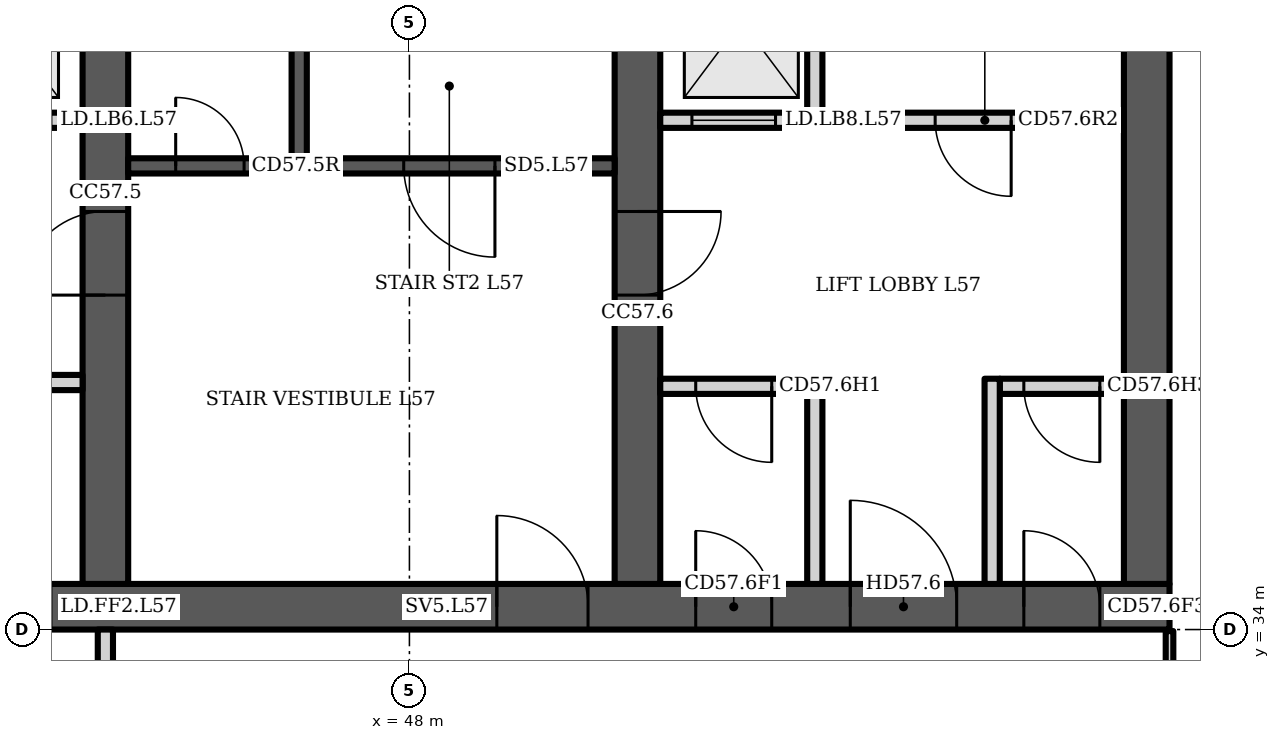
"""IFC4 building model, lengths in metres.
Left out: names, types, materials, properties, quantities, classifications, styles, units other than length and angle.
Written with IfcOpenShell. Run it as: python <this file> out.ifc"""

import sys

from ifc_helpers import new_model, si_unit, direction, frame, frame_2d, origin, place, context, subcontext, project, spatial, polyline, rectangle, outline, extrude, element, fill, save


model = new_model("IFC4")
c1 = context("Model", 3, precision=1e-05, world=origin(), true_north=direction((0.0, 1.0)))
c2 = subcontext(c1, "Body", "Model", "MODEL_VIEW")
j1 = project(units=[si_unit("LENGTHUNIT", "METRE"), si_unit("PLANEANGLEUNIT", "RADIAN")], contexts=[c1])
p1 = place(None, origin())
s1 = spatial("IfcSite", under=j1, at=p1, CompositionType="ELEMENT")
p2 = place(p1, origin())
s2 = spatial("IfcBuilding", under=s1, at=p2, CompositionType="ELEMENT")
p3 = place(p2, frame((0.0, 0.0, 228.7)))
s3 = spatial("IfcBuildingStorey", under=s2, at=p3, CompositionType="ELEMENT", Elevation=228.7)
p4 = place(p3, frame((23.0, 34.3, 0.0), z_axis=(0.0, 0.0, 1.0), x_axis=(1.0, 0.0, 0.0)))
e1 = element("IfcWall", 1, at=p4, inside=s3, PredefinedType="SHEAR", context=c2, shape_type="SweptSolid", body=[
    extrude(rectangle(XDim=35.0, YDim=0.6, at=frame_2d((17.5, 0.0))), origin(), (0.0, 0.0, 1.0), 3.6),
])
p5 = place(p4, frame((0.65, 0.0, 0.0)))
e2 = element("IfcOpeningElement", 2, at=p5, cuts=e1, PredefinedType="OPENING", context=c2, shape_type="SweptSolid", body=[
    extrude(rectangle(XDim=1.2, YDim=2.1, at=frame_2d((0.6, 1.05))), frame((0.0, 0.31, 0.0), z_axis=(0.0, -1.0, 0.0), x_axis=(1.0, 0.0, 0.0)), (0.0, 0.0, 1.0), 0.62),
])
p6 = place(p4, frame((7.717, 0.0, 0.0)))
e3 = element("IfcOpeningElement", 3, at=p6, cuts=e1, PredefinedType="OPENING", context=c2, shape_type="SweptSolid", body=[
    extrude(rectangle(XDim=1.1, YDim=2.1, at=frame_2d((0.55, 1.05))), frame((0.0, 0.31, 0.0), z_axis=(0.0, -1.0, 0.0), x_axis=(1.0, 0.0, 0.0)), (0.0, 0.0, 1.0), 0.62),
])
p7 = place(p4, frame((12.183, 0.0, 0.0)))
e4 = element("IfcOpeningElement", 4, at=p7, cuts=e1, PredefinedType="OPENING", context=c2, shape_type="SweptSolid", body=[
    extrude(rectangle(XDim=1.1, YDim=2.1, at=frame_2d((0.55, 1.05))), frame((0.0, 0.31, 0.0), z_axis=(0.0, -1.0, 0.0), x_axis=(1.0, 0.0, 0.0)), (0.0, 0.0, 1.0), 0.62),
])
p8 = place(p4, frame((9.8, 0.0, 0.0)))
e5 = element("IfcOpeningElement", 5, at=p8, cuts=e1, PredefinedType="OPENING", context=c2, shape_type="SweptSolid", body=[
    extrude(rectangle(XDim=1.4, YDim=2.1, at=frame_2d((0.7, 1.05))), frame((0.0, 0.31, 0.0), z_axis=(0.0, -1.0, 0.0), x_axis=(1.0, 0.0, 0.0)), (0.0, 0.0, 1.0), 0.62),
])
p9 = place(p4, frame((14.717, 0.0, 0.0)))
e6 = element("IfcOpeningElement", 6, at=p9, cuts=e1, PredefinedType="OPENING", context=c2, shape_type="SweptSolid", body=[
    extrude(rectangle(XDim=1.1, YDim=2.1, at=frame_2d((0.55, 1.05))), frame((0.0, 0.31, 0.0), z_axis=(0.0, -1.0, 0.0), x_axis=(1.0, 0.0, 0.0)), (0.0, 0.0, 1.0), 0.62),
])
p10 = place(p4, frame((16.95, 0.0, 0.0)))
e7 = element("IfcOpeningElement", 7, at=p10, cuts=e1, PredefinedType="OPENING", context=c2, shape_type="SweptSolid", body=[
    extrude(rectangle(XDim=1.1, YDim=2.1, at=frame_2d((0.55, 1.05))), frame((0.0, 0.31, 0.0), z_axis=(0.0, -1.0, 0.0), x_axis=(1.0, 0.0, 0.0)), (0.0, 0.0, 1.0), 0.62),
])
p11 = place(p4, frame((19.183, 0.0, 0.0)))
e8 = element("IfcOpeningElement", 8, at=p11, cuts=e1, PredefinedType="OPENING", context=c2, shape_type="SweptSolid", body=[
    extrude(rectangle(XDim=1.1, YDim=2.1, at=frame_2d((0.55, 1.05))), frame((0.0, 0.31, 0.0), z_axis=(0.0, -1.0, 0.0), x_axis=(1.0, 0.0, 0.0)), (0.0, 0.0, 1.0), 0.62),
])
p12 = place(p4, frame((26.15, 0.0, 0.0)))
e9 = element("IfcOpeningElement", 9, at=p12, cuts=e1, PredefinedType="OPENING", context=c2, shape_type="SweptSolid", body=[
    extrude(rectangle(XDim=1.2, YDim=2.1, at=frame_2d((0.6, 1.05))), frame((0.0, 0.31, 0.0), z_axis=(0.0, -1.0, 0.0), x_axis=(1.0, 0.0, 0.0)), (0.0, 0.0, 1.0), 0.62),
])
p13 = place(p4, frame((28.767, 0.0, 0.0)))
e10 = element("IfcOpeningElement", 10, at=p13, cuts=e1, PredefinedType="OPENING", context=c2, shape_type="SweptSolid", body=[
    extrude(rectangle(XDim=1.0, YDim=2.1, at=frame_2d((0.5, 1.05))), frame((0.0, 0.31, 0.0), z_axis=(0.0, -1.0, 0.0), x_axis=(1.0, 0.0, 0.0)), (0.0, 0.0, 1.0), 0.62),
])
p14 = place(p4, frame((33.083, 0.0, 0.0)))
e11 = element("IfcOpeningElement", 11, at=p14, cuts=e1, PredefinedType="OPENING", context=c2, shape_type="SweptSolid", body=[
    extrude(rectangle(XDim=1.0, YDim=2.1, at=frame_2d((0.5, 1.05))), frame((0.0, 0.31, 0.0), z_axis=(0.0, -1.0, 0.0), x_axis=(1.0, 0.0, 0.0)), (0.0, 0.0, 1.0), 0.62),
])
p15 = place(p4, frame((30.8, 0.0, 0.0)))
e12 = element("IfcOpeningElement", 12, at=p15, cuts=e1, PredefinedType="OPENING", context=c2, shape_type="SweptSolid", body=[
    extrude(rectangle(XDim=1.4, YDim=2.1, at=frame_2d((0.7, 1.05))), frame((0.0, 0.31, 0.0), z_axis=(0.0, -1.0, 0.0), x_axis=(1.0, 0.0, 0.0)), (0.0, 0.0, 1.0), 0.62),
])
p16 = place(p3, frame((44.0, 34.6, 0.0), z_axis=(0.0, 0.0, 1.0), x_axis=(0.0, 1.0, 0.0)))
e13 = element("IfcWall", 13, at=p16, inside=s3, PredefinedType="SHEAR", context=c2, shape_type="SweptSolid", body=[
    extrude(rectangle(XDim=14.784, YDim=0.6, at=frame_2d((7.392, 0.0))), origin(), (0.0, 0.0, 1.0), 3.6),
])
p17 = place(p16, frame((11.608, 0.0, 0.0)))
e14 = element("IfcOpeningElement", 14, at=p17, cuts=e13, PredefinedType="OPENING", context=c2, shape_type="SweptSolid", body=[
    extrude(rectangle(XDim=1.0, YDim=2.1, at=frame_2d((0.5, 1.05))), frame((0.0, 0.31, 0.0), z_axis=(0.0, -1.0, 0.0), x_axis=(1.0, 0.0, 0.0)), (0.0, 0.0, 1.0), 0.62),
])
p18 = place(p16, frame((3.8, 0.0, 0.0)))
e15 = element("IfcOpeningElement", 15, at=p18, cuts=e13, PredefinedType="OPENING", context=c2, shape_type="SweptSolid", body=[
    extrude(rectangle(XDim=1.1, YDim=2.1, at=frame_2d((0.55, 1.05))), frame((0.0, 0.31, 0.0), z_axis=(0.0, -1.0, 0.0), x_axis=(1.0, 0.0, 0.0)), (0.0, 0.0, 1.0), 0.62),
])
p19 = place(p3, frame((51.0, 34.6, 0.0), z_axis=(0.0, 0.0, 1.0), x_axis=(0.0, 1.0, 0.0)))
e16 = element("IfcWall", 16, at=p19, inside=s3, PredefinedType="SHEAR", context=c2, shape_type="SweptSolid", body=[
    extrude(rectangle(XDim=14.171, YDim=0.6, at=frame_2d((7.085, 0.0))), origin(), (0.0, 0.0, 1.0), 3.6),
])
p20 = place(p19, frame((3.8, 0.0, 0.0)))
e17 = element("IfcOpeningElement", 17, at=p20, cuts=e16, PredefinedType="OPENING", context=c2, shape_type="SweptSolid", body=[
    extrude(rectangle(XDim=1.1, YDim=2.1, at=frame_2d((0.55, 1.05))), frame((0.0, 0.31, 0.0), z_axis=(0.0, -1.0, 0.0), x_axis=(1.0, 0.0, 0.0)), (0.0, 0.0, 1.0), 0.62),
])
p21 = place(p3, frame((57.7, 34.6, 0.0), z_axis=(0.0, 0.0, 1.0), x_axis=(0.0, 1.0, 0.0)))
e18 = element("IfcWall", 18, at=p21, inside=s3, PredefinedType="SHEAR", context=c2, shape_type="SweptSolid", body=[
    extrude(rectangle(XDim=13.585, YDim=0.6, at=frame_2d((6.792, 0.0))), origin(), (0.0, 0.0, 1.0), 3.6),
])
p22 = place(p3, frame((37.3, 40.7, 0.0), z_axis=(0.0, 0.0, 1.0), x_axis=(1.0, 0.0, 0.0)))
e19 = element("IfcWall", 19, at=p22, inside=s3, PredefinedType="PARTITIONING", context=c2, shape_type="SweptSolid", body=[
    extrude(rectangle(XDim=6.4, YDim=0.2, at=frame_2d((3.2, 0.0))), origin(), (0.0, 0.0, 1.0), 3.2),
])
p23 = place(p22, frame((0.417, 0.0, 0.0)))
e20 = element("IfcOpeningElement", 20, at=p23, cuts=e19, PredefinedType="OPENING", context=c2, shape_type="SweptSolid", body=[
    extrude(rectangle(XDim=1.1, YDim=2.1, at=frame_2d((0.55, 1.05))), frame((0.0, 0.11, 0.0), z_axis=(0.0, -1.0, 0.0), x_axis=(1.0, 0.0, 0.0)), (0.0, 0.0, 1.0), 0.22),
])
p24 = place(p22, frame((2.65, 0.0, 0.0)))
e21 = element("IfcOpeningElement", 21, at=p24, cuts=e19, PredefinedType="OPENING", context=c2, shape_type="SweptSolid", body=[
    extrude(rectangle(XDim=1.1, YDim=2.1, at=frame_2d((0.55, 1.05))), frame((0.0, 0.11, 0.0), z_axis=(0.0, -1.0, 0.0), x_axis=(1.0, 0.0, 0.0)), (0.0, 0.0, 1.0), 0.22),
])
p25 = place(p22, frame((4.883, 0.0, 0.0)))
e22 = element("IfcOpeningElement", 22, at=p25, cuts=e19, PredefinedType="OPENING", context=c2, shape_type="SweptSolid", body=[
    extrude(rectangle(XDim=1.1, YDim=2.1, at=frame_2d((0.55, 1.05))), frame((0.0, 0.11, 0.0), z_axis=(0.0, -1.0, 0.0), x_axis=(1.0, 0.0, 0.0)), (0.0, 0.0, 1.0), 0.22),
])
p26 = place(p3, frame((0.0, 0.0, -0.0)))
e23 = element("IfcWall", 23, at=p26, inside=s3, PredefinedType="PARTITIONING", context=c2, shape_type="SweptSolid", body=[
    extrude(outline(polyline([(41.567, 37.1), (39.433, 37.1), (39.433, 34.6), (39.233, 34.6), (39.233, 37.45), (37.3, 37.45), (37.3, 37.65), (39.233, 37.65), (39.433, 37.65), (39.433, 37.3), (41.567, 37.3), (41.567, 37.35), (41.767, 37.35), (43.7, 37.35), (43.7, 37.15), (41.767, 37.15), (41.767, 34.6), (41.567, 34.6), (41.567, 37.1)])), origin(), (0.0, 0.0, 1.0), 3.2),
])
p27 = place(p3, frame((0.0, 0.0, -0.0)))
e24 = element("IfcWall", 24, at=p27, inside=s3, PredefinedType="PARTITIONING", context=c2, shape_type="SweptSolid", body=[
    extrude(outline(polyline([(39.433, 40.8), (39.233, 40.8), (39.233, 43.8), (37.3, 43.8), (37.3, 44.0), (43.7, 44.0), (43.7, 43.8), (41.767, 43.8), (41.767, 40.8), (41.567, 40.8), (41.567, 43.8), (39.433, 43.8), (39.433, 40.8)])), origin(), (0.0, 0.0, 1.0), 3.2),
])
p28 = place(p3, frame((44.3, 40.1, 0.0), z_axis=(0.0, 0.0, 1.0), x_axis=(1.0, 0.0, 0.0)))
e25 = element("IfcWall", 25, at=p28, inside=s3, PredefinedType="SHEAR", context=c2, shape_type="SweptSolid", body=[
    extrude(rectangle(XDim=6.4, YDim=0.2, at=frame_2d((3.2, 0.0))), origin(), (0.0, 0.0, 1.0), 3.2),
])
p29 = place(p28, frame((3.625, 0.0, 0.0)))
e26 = element("IfcOpeningElement", 26, at=p29, cuts=e25, PredefinedType="OPENING", context=c2, shape_type="SweptSolid", body=[
    extrude(rectangle(XDim=1.2, YDim=2.1, at=frame_2d((0.6, 1.05))), frame((0.0, 0.11, 0.0), z_axis=(0.0, -1.0, 0.0), x_axis=(1.0, 0.0, 0.0)), (0.0, 0.0, 1.0), 0.22),
])
p30 = place(p28, frame((0.625, 0.0, 0.0)))
e27 = element("IfcOpeningElement", 27, at=p30, cuts=e25, PredefinedType="OPENING", context=c2, shape_type="SweptSolid", body=[
    extrude(rectangle(XDim=0.9, YDim=2.1, at=frame_2d((0.45, 1.05))), frame((0.0, 0.11, 0.0), z_axis=(0.0, -1.0, 0.0), x_axis=(1.0, 0.0, 0.0)), (0.0, 0.0, 1.0), 0.22),
])
p31 = place(p3, frame((46.55, 40.2, 0.0), z_axis=(0.0, 0.0, 1.0), x_axis=(0.0, 1.0, 0.0)))
e28 = element("IfcWall", 28, at=p31, inside=s3, PredefinedType="SHEAR", context=c2, shape_type="SweptSolid", body=[
    extrude(rectangle(XDim=7.2, YDim=0.2, at=frame_2d((3.6, 0.0))), origin(), (0.0, 0.0, 1.0), 3.2),
])
p32 = place(p3, frame((51.3, 37.2, 0.0), z_axis=(0.0, 0.0, 1.0), x_axis=(1.0, 0.0, 0.0)))
e29 = element("IfcWall", 29, at=p32, inside=s3, PredefinedType="PARTITIONING", context=c2, shape_type="SweptSolid", body=[
    extrude(rectangle(XDim=1.933, YDim=0.2, at=frame_2d((0.967, 0.0))), origin(), (0.0, 0.0, 1.0), 3.2),
])
p33 = place(p32, frame((0.467, 0.0, 0.0)))
e30 = element("IfcOpeningElement", 30, at=p33, cuts=e29, PredefinedType="OPENING", context=c2, shape_type="SweptSolid", body=[
    extrude(rectangle(XDim=1.0, YDim=2.1, at=frame_2d((0.5, 1.05))), frame((0.0, 0.11, 0.0), z_axis=(0.0, -1.0, 0.0), x_axis=(1.0, 0.0, 0.0)), (0.0, 0.0, 1.0), 0.22),
])
p34 = place(p3, frame((55.767, 37.2, 0.0), z_axis=(0.0, 0.0, 1.0), x_axis=(1.0, 0.0, 0.0)))
e31 = element("IfcWall", 31, at=p34, inside=s3, PredefinedType="PARTITIONING", context=c2, shape_type="SweptSolid", body=[
    extrude(rectangle(XDim=1.633, YDim=0.2, at=frame_2d((0.817, 0.0))), origin(), (0.0, 0.0, 1.0), 3.2),
])
p35 = place(p34, frame((0.317, 0.0, 0.0)))
e32 = element("IfcOpeningElement", 32, at=p35, cuts=e31, PredefinedType="OPENING", context=c2, shape_type="SweptSolid", body=[
    extrude(rectangle(XDim=1.0, YDim=2.1, at=frame_2d((0.5, 1.05))), frame((0.0, 0.11, 0.0), z_axis=(0.0, -1.0, 0.0), x_axis=(1.0, 0.0, 0.0)), (0.0, 0.0, 1.0), 0.22),
])
p36 = place(p3, frame((51.3, 40.7, 0.0), z_axis=(0.0, 0.0, 1.0), x_axis=(1.0, 0.0, 0.0)))
e33 = element("IfcWall", 33, at=p36, inside=s3, PredefinedType="PARTITIONING", context=c2, shape_type="SweptSolid", body=[
    extrude(rectangle(XDim=6.1, YDim=0.2, at=frame_2d((3.05, 0.0))), origin(), (0.0, 0.0, 1.0), 3.2),
])
p37 = place(p36, frame((0.417, 0.0, 0.0)))
e34 = element("IfcOpeningElement", 34, at=p37, cuts=e33, PredefinedType="OPENING", context=c2, shape_type="SweptSolid", body=[
    extrude(rectangle(XDim=1.1, YDim=2.1, at=frame_2d((0.55, 1.05))), frame((0.0, 0.11, 0.0), z_axis=(0.0, -1.0, 0.0), x_axis=(1.0, 0.0, 0.0)), (0.0, 0.0, 1.0), 0.22),
])
p38 = place(p36, frame((3.617, 0.0, 0.0)))
e35 = element("IfcOpeningElement", 35, at=p38, cuts=e33, PredefinedType="OPENING", context=c2, shape_type="SweptSolid", body=[
    extrude(rectangle(XDim=1.0, YDim=2.1, at=frame_2d((0.5, 1.05))), frame((0.0, 0.11, 0.0), z_axis=(0.0, -1.0, 0.0), x_axis=(1.0, 0.0, 0.0)), (0.0, 0.0, 1.0), 0.22),
])
p39 = place(p3, frame((0.0, 0.0, -0.0)))
e36 = element("IfcWall", 36, at=p39, inside=s3, PredefinedType="PARTITIONING", context=c2, shape_type="SweptSolid", body=[
    extrude(outline(polyline([(53.233, 34.6), (53.233, 37.3), (53.433, 37.3), (53.433, 34.6), (53.233, 34.6)])), origin(), (0.0, 0.0, 1.0), 3.2),
])
p40 = place(p3, frame((0.0, 0.0, -0.0)))
e37 = element("IfcWall", 37, at=p40, inside=s3, PredefinedType="PARTITIONING", context=c2, shape_type="SweptSolid", body=[
    extrude(outline(polyline([(55.567, 34.6), (55.567, 37.3), (55.767, 37.3), (55.767, 34.6), (55.567, 34.6)])), origin(), (0.0, 0.0, 1.0), 3.2),
])
p41 = place(p3, frame((0.0, 0.0, -0.0)))
e38 = element("IfcWall", 38, at=p41, inside=s3, PredefinedType="PARTITIONING", context=c2, shape_type="SweptSolid", body=[
    extrude(outline(polyline([(53.433, 40.8), (53.433, 43.8), (53.233, 43.8), (53.233, 40.8), (53.433, 40.8)])), origin(), (0.0, 0.0, 1.0), 3.2),
])
p42 = place(p3, frame((44.0, 30.5, 0.0), z_axis=(0.0, 0.0, 1.0), x_axis=(0.0, 1.0, 0.0)))
e39 = element("IfcWall", 39, at=p42, inside=s3, PredefinedType="PARTITIONING", context=c2, shape_type="SweptSolid", body=[
    extrude(rectangle(XDim=3.5, YDim=0.2, at=frame_2d((1.75, 0.0))), origin(), (0.0, 0.0, 1.0), 3.2),
])
p43 = place(p42, frame((1.2, 0.0, 0.0)))
e40 = element("IfcOpeningElement", 40, at=p43, cuts=e39, PredefinedType="OPENING", context=c2, shape_type="SweptSolid", body=[
    extrude(rectangle(XDim=1.1, YDim=2.1, at=frame_2d((0.55, 1.05))), frame((0.0, 0.11, 0.0), z_axis=(0.0, -1.0, 0.0), x_axis=(1.0, 0.0, 0.0)), (0.0, 0.0, 1.0), 0.22),
])
p44 = place(p3, frame((58.0, 31.5, 0.0), z_axis=(0.0, 0.0, 1.0), x_axis=(0.0, 1.0, 0.0)))
e41 = element("IfcWall", 41, at=p44, inside=s3, PredefinedType="PARTITIONING", context=c2, shape_type="SweptSolid", body=[
    extrude(rectangle(XDim=2.48, YDim=0.1, at=frame_2d((1.24, 0.0))), origin(), (0.0, 0.0, 1.0), 3.2),
])
p45 = place(p29, origin())
e42 = element("IfcDoor", 42, at=p45, inside=s3, OperationType="SINGLE_SWING_RIGHT", PredefinedType="DOOR", context=c2, shape_type="SweptSolid", body=[
    extrude(rectangle(XDim=1.2, YDim=2.1, at=frame_2d((0.6, 1.05))), frame((0.0, 0.025, 0.0), z_axis=(0.0, -1.0, 0.0), x_axis=(1.0, 0.0, 0.0)), (0.0, 0.0, 1.0), 0.05),
])
fill(e26, e42)
p46 = place(p30, origin())
e43 = element("IfcDoor", 43, at=p46, inside=s3, OperationType="SINGLE_SWING_LEFT", PredefinedType="DOOR", context=c2, shape_type="SweptSolid", body=[
    extrude(rectangle(XDim=0.9, YDim=2.1, at=frame_2d((0.45, 1.05))), frame((0.0, 0.025, 0.0), z_axis=(0.0, -1.0, 0.0), x_axis=(1.0, 0.0, 0.0)), (0.0, 0.0, 1.0), 0.05),
])
fill(e27, e43)
p47 = place(p12, origin())
e44 = element("IfcDoor", 44, at=p47, inside=s3, OperationType="SINGLE_SWING_LEFT", PredefinedType="DOOR", context=c2, shape_type="SweptSolid", body=[
    extrude(rectangle(XDim=1.2, YDim=2.1, at=frame_2d((0.6, 1.05))), frame((0.0, 0.025, 0.0), z_axis=(0.0, -1.0, 0.0), x_axis=(1.0, 0.0, 0.0)), (0.0, 0.0, 1.0), 0.05),
])
fill(e9, e44)
p48 = place(p13, origin())
e45 = element("IfcDoor", 45, at=p48, inside=s3, OperationType="SINGLE_SWING_LEFT", PredefinedType="DOOR", context=c2, shape_type="SweptSolid", body=[
    extrude(rectangle(XDim=1.0, YDim=2.1, at=frame_2d((0.5, 1.05))), frame((0.0, 0.025, 0.0), z_axis=(0.0, -1.0, 0.0), x_axis=(1.0, 0.0, 0.0)), (0.0, 0.0, 1.0), 0.05),
])
fill(e10, e45)
p49 = place(p33, origin())
e46 = element("IfcDoor", 46, at=p49, inside=s3, OperationType="SINGLE_SWING_RIGHT", PredefinedType="DOOR", context=c2, shape_type="SweptSolid", body=[
    extrude(rectangle(XDim=1.0, YDim=2.1, at=frame_2d((0.5, 1.05))), frame((0.0, 0.025, 0.0), z_axis=(0.0, -1.0, 0.0), x_axis=(1.0, 0.0, 0.0)), (0.0, 0.0, 1.0), 0.05),
])
fill(e30, e46)
p50 = place(p14, origin())
e47 = element("IfcDoor", 47, at=p50, inside=s3, OperationType="SINGLE_SWING_LEFT", PredefinedType="DOOR", context=c2, shape_type="SweptSolid", body=[
    extrude(rectangle(XDim=1.0, YDim=2.1, at=frame_2d((0.5, 1.05))), frame((0.0, 0.025, 0.0), z_axis=(0.0, -1.0, 0.0), x_axis=(1.0, 0.0, 0.0)), (0.0, 0.0, 1.0), 0.05),
])
fill(e11, e47)
p51 = place(p35, origin())
e48 = element("IfcDoor", 48, at=p51, inside=s3, OperationType="SINGLE_SWING_RIGHT", PredefinedType="DOOR", context=c2, shape_type="SweptSolid", body=[
    extrude(rectangle(XDim=1.0, YDim=2.1, at=frame_2d((0.5, 1.05))), frame((0.0, 0.025, 0.0), z_axis=(0.0, -1.0, 0.0), x_axis=(1.0, 0.0, 0.0)), (0.0, 0.0, 1.0), 0.05),
])
fill(e32, e48)
p52 = place(p15, origin())
e49 = element("IfcDoor", 49, at=p52, inside=s3, OperationType="DOUBLE_DOOR_SINGLE_SWING", PredefinedType="DOOR", context=c2, shape_type="SweptSolid", body=[
    extrude(rectangle(XDim=1.4, YDim=2.1, at=frame_2d((0.7, 1.05))), frame((0.0, 0.025, 0.0), z_axis=(0.0, -1.0, 0.0), x_axis=(1.0, 0.0, 0.0)), (0.0, 0.0, 1.0), 0.05),
])
fill(e12, e49)
p53 = place(p37, origin())
e50 = element("IfcDoor", 50, at=p53, inside=s3, OperationType="DOUBLE_DOOR_SLIDING", PredefinedType="DOOR", context=c2, shape_type="SweptSolid", body=[
    extrude(rectangle(XDim=1.1, YDim=2.1, at=frame_2d((0.55, 1.05))), frame((0.0, 0.025, 0.0), z_axis=(0.0, -1.0, 0.0), x_axis=(1.0, 0.0, 0.0)), (0.0, 0.0, 1.0), 0.05),
])
fill(e34, e50)
p54 = place(p38, origin())
e51 = element("IfcDoor", 51, at=p54, inside=s3, OperationType="SINGLE_SWING_RIGHT", PredefinedType="DOOR", context=c2, shape_type="SweptSolid", body=[
    extrude(rectangle(XDim=1.0, YDim=2.1, at=frame_2d((0.5, 1.05))), frame((0.0, 0.025, 0.0), z_axis=(0.0, -1.0, 0.0), x_axis=(1.0, 0.0, 0.0)), (0.0, 0.0, 1.0), 0.05),
])
fill(e35, e51)
p55 = place(p18, origin())
e52 = element("IfcDoor", 52, at=p55, inside=s3, OperationType="SINGLE_SWING_LEFT", PredefinedType="DOOR", context=c2, shape_type="SweptSolid", body=[
    extrude(rectangle(XDim=1.1, YDim=2.1, at=frame_2d((0.55, 1.05))), frame((0.0, 0.025, 0.0), z_axis=(0.0, -1.0, 0.0), x_axis=(1.0, 0.0, 0.0)), (0.0, 0.0, 1.0), 0.05),
])
fill(e15, e52)
p56 = place(p20, origin())
e53 = element("IfcDoor", 53, at=p56, inside=s3, OperationType="SINGLE_SWING_RIGHT", PredefinedType="DOOR", context=c2, shape_type="SweptSolid", body=[
    extrude(rectangle(XDim=1.1, YDim=2.1, at=frame_2d((0.55, 1.05))), frame((0.0, 0.025, 0.0), z_axis=(0.0, -1.0, 0.0), x_axis=(1.0, 0.0, 0.0)), (0.0, 0.0, 1.0), 0.05),
])
fill(e17, e53)
save(model, sys.argv[1])
